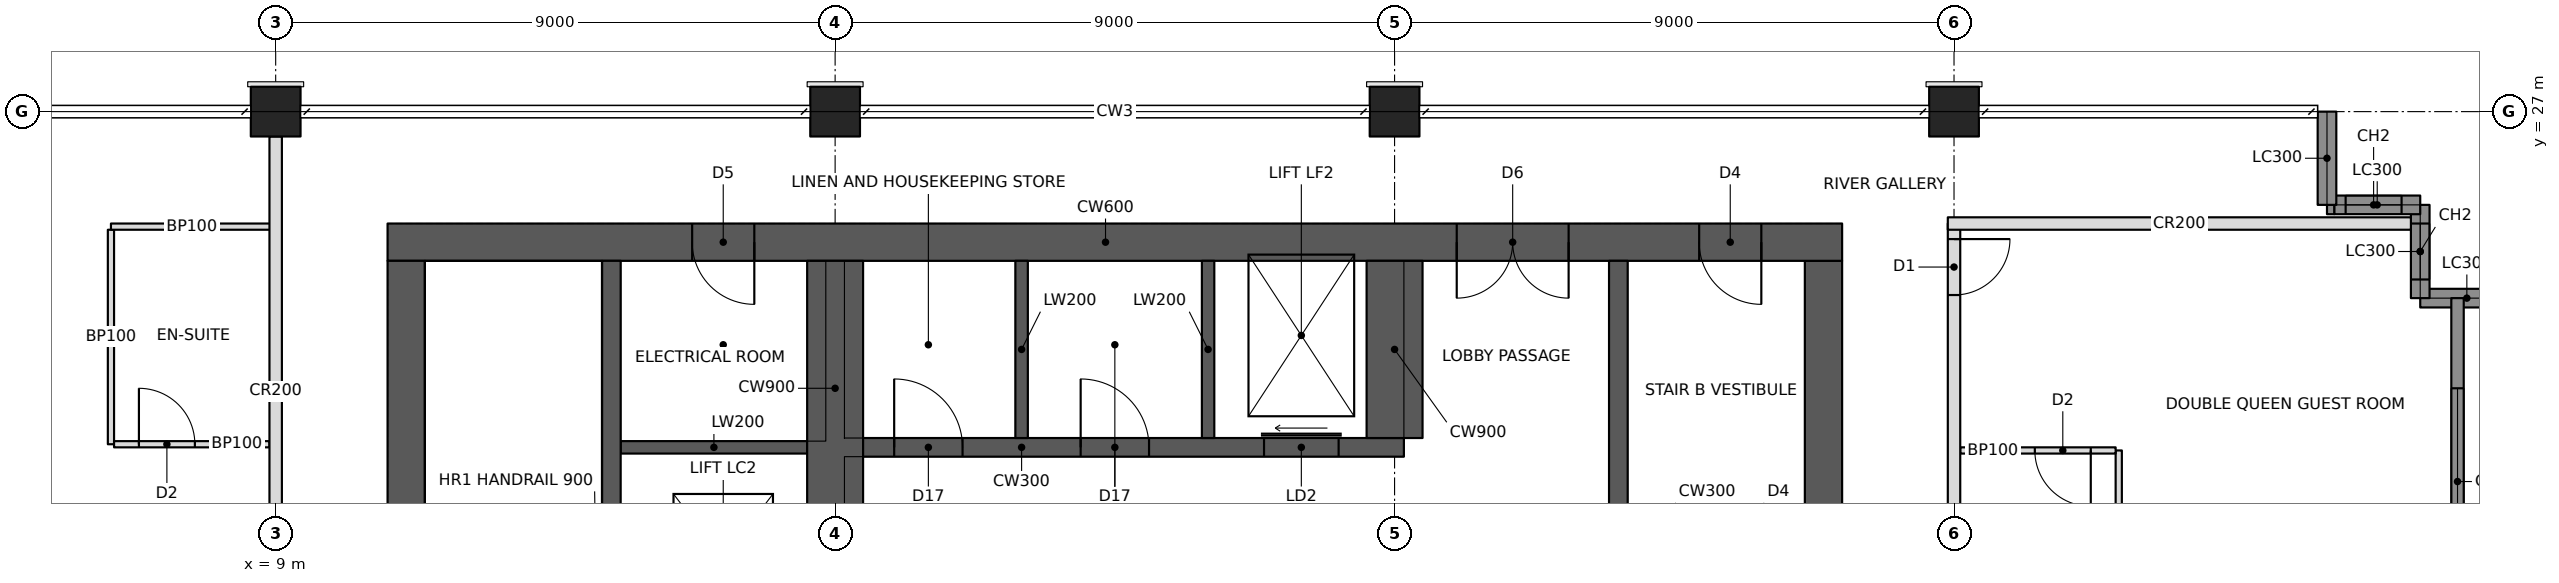
"""IFC4 building model, lengths in metres.
Left out: names, types, materials, properties, quantities, classifications, styles, units other than length and angle.
Written with IfcOpenShell. Run it as: python <this file> out.ifc"""

import sys

from ifc_helpers import new_model, si_unit, direction, frame, frame_2d, origin, origin_2d, place, context, subcontext, project, spatial, rectangle, hollow_rectangle, extrude, element, fill, save


model = new_model("IFC4")
c1 = context("Model", 3, precision=1e-05, world=origin(), true_north=direction((0.0, 1.0)))
c2 = subcontext(c1, "Body", "Model", "MODEL_VIEW")
j1 = project(units=[si_unit("LENGTHUNIT", "METRE"), si_unit("PLANEANGLEUNIT", "RADIAN")], contexts=[c1])
p1 = place(None, origin())
s1 = spatial("IfcSite", under=j1, at=p1, CompositionType="ELEMENT")
p2 = place(p1, origin())
s2 = spatial("IfcBuilding", under=s1, at=p2, CompositionType="ELEMENT")
p3 = place(p2, frame((0.0, 0.0, 218.2)))
s3 = spatial("IfcBuildingStorey", under=s2, at=p3, CompositionType="ELEMENT", Elevation=218.2)
for number, where, z_axis, x_axis in (
    (1, (9.0, 27.0, 0.0), (0.0, 0.0, 1.0), (1.0, 0.0, 0.0)),
    (2, (18.0, 27.0, 0.0), (0.0, 0.0, 1.0), (1.0, 0.0, 0.0)),
    (3, (27.0, 27.0, 0.0), (0.0, 0.0, 1.0), (1.0, 0.0, 0.0)),
    (4, (36.0, 27.0, 0.0), (0.0, 0.0, 1.0), (1.0, 0.0, 0.0)),
):
    element("IfcColumn", number, at=place(p3, frame(where, z_axis=z_axis, x_axis=x_axis)), inside=s3, PredefinedType="COLUMN", context=c2, shape_type="SweptSolid", body=[
        extrude(hollow_rectangle(XDim=0.8, YDim=0.8, WallThickness=0.06, at=origin_2d()), origin(), (0.0, 0.0, 1.0), 3.4),
    ])
p4 = place(p3, frame((10.8, 24.9, 0.0), z_axis=(0.0, 0.0, 1.0), x_axis=(1.0, 0.0, 0.0)))
e5 = element("IfcWall", 5, at=p4, inside=s3, PredefinedType="SHEAR", context=c2, shape_type="SweptSolid", body=[
    extrude(rectangle(XDim=23.4, YDim=0.6, at=frame_2d((11.7, 0.0))), origin(), (0.0, 0.0, 1.0), 3.4),
])
p5 = place(p4, frame((17.2, 0.0, 0.0)))
e6 = element("IfcOpeningElement", 6, at=p5, cuts=e5, PredefinedType="OPENING", context=c2, shape_type="SweptSolid", body=[
    extrude(rectangle(XDim=1.8, YDim=2.1, at=frame_2d((0.9, 1.05))), frame((0.0, 0.31, 0.0), z_axis=(0.0, -1.0, 0.0), x_axis=(1.0, 0.0, 0.0)), (0.0, 0.0, 1.0), 0.62),
])
p6 = place(p4, frame((21.1, 0.0, 0.0)))
e7 = element("IfcOpeningElement", 7, at=p6, cuts=e5, PredefinedType="OPENING", context=c2, shape_type="SweptSolid", body=[
    extrude(rectangle(XDim=1.0, YDim=2.1, at=frame_2d((0.5, 1.05))), frame((0.0, 0.31, 0.0), z_axis=(0.0, -1.0, 0.0), x_axis=(1.0, 0.0, 0.0)), (0.0, 0.0, 1.0), 0.62),
])
p7 = place(p4, frame((4.9, 0.0, 0.0)))
e8 = element("IfcOpeningElement", 8, at=p7, cuts=e5, PredefinedType="OPENING", context=c2, shape_type="SweptSolid", body=[
    extrude(rectangle(XDim=1.0, YDim=2.1, at=frame_2d((0.5, 1.05))), frame((0.0, 0.31, 0.0), z_axis=(0.0, -1.0, 0.0), x_axis=(1.0, 0.0, 0.0)), (0.0, 0.0, 1.0), 0.62),
])
for number, where, z_axis, x_axis in (
    (9, (11.1, 11.4, 0.0), (0.0, 0.0, 1.0), (0.0, 1.0, 0.0)),
    (10, (33.9, 11.4, 0.0), (0.0, 0.0, 1.0), (0.0, 1.0, 0.0)),
):
    element("IfcWall", number, at=place(p3, frame(where, z_axis=z_axis, x_axis=x_axis)), inside=s3, PredefinedType="SHEAR", context=c2, shape_type="SweptSolid", body=[
        extrude(rectangle(XDim=13.2, YDim=0.6, at=frame_2d((6.6, 0.0))), origin(), (0.0, 0.0, 1.0), 3.4),
    ])
p8 = place(p3, frame((14.4, 11.4, 0.0), z_axis=(0.0, 0.0, 1.0), x_axis=(0.0, 1.0, 0.0)))
e11 = element("IfcWall", 11, at=p8, inside=s3, PredefinedType="SHEAR", context=c2, shape_type="SweptSolid", body=[
    extrude(rectangle(XDim=13.2, YDim=0.3, at=frame_2d((6.6, 0.0))), origin(), (0.0, 0.0, 1.0), 3.4),
])
p9 = place(p3, frame((18.0, 11.4, 0.0), z_axis=(0.0, 0.0, 1.0), x_axis=(0.0, 1.0, 0.0)))
e12 = element("IfcWall", 12, at=p9, inside=s3, PredefinedType="SHEAR", context=c2, shape_type="SweptSolid", body=[
    extrude(rectangle(XDim=13.2, YDim=0.9, at=frame_2d((6.6, 0.0))), origin(), (0.0, 0.0, 1.0), 3.4),
])
p10 = place(p9, frame((3.6, 0.0, 0.0)))
e13 = element("IfcOpeningElement", 13, at=p10, cuts=e12, PredefinedType="OPENING", context=c2, shape_type="SweptSolid", body=[
    extrude(rectangle(XDim=1.0, YDim=2.1, at=frame_2d((0.5, 1.05))), frame((0.0, 0.46, 0.0), z_axis=(0.0, -1.0, 0.0), x_axis=(1.0, 0.0, 0.0)), (0.0, 0.0, 1.0), 0.92),
])
p11 = place(p9, frame((7.85, 0.0, 0.0)))
e14 = element("IfcOpeningElement", 14, at=p11, cuts=e12, PredefinedType="OPENING", context=c2, shape_type="SweptSolid", body=[
    extrude(rectangle(XDim=1.1, YDim=2.1, at=frame_2d((0.55, 1.05))), frame((0.0, 0.46, 0.0), z_axis=(0.0, -1.0, 0.0), x_axis=(1.0, 0.0, 0.0)), (0.0, 0.0, 1.0), 0.92),
])
p12 = place(p3, frame((18.15, 21.6, 0.0), z_axis=(0.0, 0.0, 1.0), x_axis=(1.0, 0.0, 0.0)))
e15 = element("IfcWall", 15, at=p12, inside=s3, PredefinedType="SHEAR", context=c2, shape_type="SweptSolid", body=[
    extrude(rectangle(XDim=9.0, YDim=0.3, at=frame_2d((4.5, 0.0))), origin(), (0.0, 0.0, 1.0), 3.4),
])
p13 = place(p12, frame((6.75, 0.0, 0.0)))
e16 = element("IfcOpeningElement", 16, at=p13, cuts=e15, PredefinedType="OPENING", context=c2, shape_type="SweptSolid", body=[
    extrude(rectangle(XDim=1.2, YDim=2.1, at=frame_2d((0.6, 1.05))), frame((0.0, 0.16, 0.0), z_axis=(0.0, -1.0, 0.0), x_axis=(1.0, 0.0, 0.0)), (0.0, 0.0, 1.0), 0.32),
])
p14 = place(p12, frame((0.8, 0.0, 0.0)))
e17 = element("IfcOpeningElement", 17, at=p14, cuts=e15, PredefinedType="OPENING", context=c2, shape_type="SweptSolid", body=[
    extrude(rectangle(XDim=1.1, YDim=2.1, at=frame_2d((0.55, 1.05))), frame((0.0, 0.16, 0.0), z_axis=(0.0, -1.0, 0.0), x_axis=(1.0, 0.0, 0.0)), (0.0, 0.0, 1.0), 0.32),
])
p15 = place(p12, frame((3.8, 0.0, 0.0)))
e18 = element("IfcOpeningElement", 18, at=p15, cuts=e15, PredefinedType="OPENING", context=c2, shape_type="SweptSolid", body=[
    extrude(rectangle(XDim=1.1, YDim=2.1, at=frame_2d((0.55, 1.05))), frame((0.0, 0.16, 0.0), z_axis=(0.0, -1.0, 0.0), x_axis=(1.0, 0.0, 0.0)), (0.0, 0.0, 1.0), 0.32),
])
p16 = place(p3, frame((27.0, 21.75, 0.0), z_axis=(0.0, 0.0, 1.0), x_axis=(0.0, 1.0, 0.0)))
e19 = element("IfcWall", 19, at=p16, inside=s3, PredefinedType="SHEAR", context=c2, shape_type="SweptSolid", body=[
    extrude(rectangle(XDim=2.85, YDim=0.9, at=frame_2d((1.425, 0.0))), origin(), (0.0, 0.0, 1.0), 3.4),
])
for number, where, z_axis, x_axis in (
    (20, (21.0, 21.75, 0.0), (0.0, 0.0, 1.0), (0.0, 1.0, 0.0)),
    (21, (24.0, 21.75, 0.0), (0.0, 0.0, 1.0), (0.0, 1.0, 0.0)),
):
    element("IfcWall", number, at=place(p3, frame(where, z_axis=z_axis, x_axis=x_axis)), inside=s3, PredefinedType="SHEAR", context=c2, shape_type="SweptSolid", body=[
        extrude(rectangle(XDim=2.85, YDim=0.2, at=frame_2d((1.425, 0.0))), origin(), (0.0, 0.0, 1.0), 3.4),
    ])
p17 = place(p3, frame((30.6, 11.4, 0.0), z_axis=(0.0, 0.0, 1.0), x_axis=(0.0, 1.0, 0.0)))
e22 = element("IfcWall", 22, at=p17, inside=s3, PredefinedType="SHEAR", context=c2, shape_type="SweptSolid", body=[
    extrude(rectangle(XDim=13.2, YDim=0.3, at=frame_2d((6.6, 0.0))), origin(), (0.0, 0.0, 1.0), 3.4),
])
p18 = place(p3, frame((14.55, 21.6, 0.0), z_axis=(0.0, 0.0, 1.0), x_axis=(1.0, 0.0, 0.0)))
e23 = element("IfcWall", 23, at=p18, inside=s3, PredefinedType="SHEAR", context=c2, shape_type="SweptSolid", body=[
    extrude(rectangle(XDim=3.0, YDim=0.2, at=frame_2d((1.5, 0.0))), origin(), (0.0, 0.0, 1.0), 3.4),
])
p19 = place(p3, frame((45.0, 24.0, 0.0), z_axis=(0.0, 0.0, 1.0), x_axis=(-1.0, 0.0, 0.0)))
e24 = element("IfcWall", 24, at=p19, inside=s3, PredefinedType="SOLIDWALL", context=c2, shape_type="SweptSolid", body=[
    extrude(rectangle(XDim=1.5, YDim=0.3, at=frame_2d((0.75, 0.0))), origin(), (0.0, 0.0, 1.0), 2.202),
])
p20 = place(p3, frame((43.5, 24.0, 0.0), z_axis=(0.0, 0.0, 1.0), x_axis=(0.0, 1.0, 0.0)))
e25 = element("IfcWall", 25, at=p20, inside=s3, PredefinedType="SOLIDWALL", context=c2, shape_type="SweptSolid", body=[
    extrude(rectangle(XDim=1.5, YDim=0.3, at=frame_2d((0.75, 0.0))), origin(), (0.0, 0.0, 1.0), 3.15),
])
p21 = place(p20, frame((0.3, 0.0, 0.6)))
e26 = element("IfcOpeningElement", 26, at=p21, cuts=e25, PredefinedType="OPENING", context=c2, shape_type="SweptSolid", body=[
    extrude(rectangle(XDim=0.9, YDim=2.2, at=frame_2d((0.45, 1.1))), frame((0.0, 0.16, 0.0), z_axis=(0.0, -1.0, 0.0), x_axis=(1.0, 0.0, 0.0)), (0.0, 0.0, 1.0), 0.32),
])
p22 = place(p3, frame((43.5, 25.5, 0.0), z_axis=(0.0, 0.0, 1.0), x_axis=(-1.0, 0.0, 0.0)))
e27 = element("IfcWall", 27, at=p22, inside=s3, PredefinedType="SOLIDWALL", context=c2, shape_type="SweptSolid", body=[
    extrude(rectangle(XDim=1.384, YDim=0.3, at=frame_2d((0.692, 0.0))), origin(), (0.0, 0.0, 1.0), 3.15),
])
p23 = place(p22, frame((0.3, 0.0, 0.6)))
e28 = element("IfcOpeningElement", 28, at=p23, cuts=e27, PredefinedType="OPENING", context=c2, shape_type="SweptSolid", body=[
    extrude(rectangle(XDim=0.9, YDim=2.2, at=frame_2d((0.45, 1.1))), frame((0.0, 0.16, 0.0), z_axis=(0.0, -1.0, 0.0), x_axis=(1.0, 0.0, 0.0)), (0.0, 0.0, 1.0), 0.32),
])
p24 = place(p3, frame((42.0, 25.5, 0.0), z_axis=(0.0, 0.0, 1.0), x_axis=(0.0, 1.0, 0.0)))
e29 = element("IfcWall", 29, at=p24, inside=s3, PredefinedType="SOLIDWALL", context=c2, shape_type="SweptSolid", body=[
    extrude(rectangle(XDim=1.5, YDim=0.3, at=frame_2d((0.75, 0.0))), origin(), (0.0, 0.0, 1.0), 2.202),
])
p25 = place(p3, frame((9.0, 18.4, 0.0), z_axis=(0.0, 0.0, 1.0), x_axis=(0.0, 1.0, 0.0)))
e30 = element("IfcWall", 30, at=p25, inside=s3, PredefinedType="PARTITIONING", context=c2, shape_type="SweptSolid", body=[
    extrude(rectangle(XDim=8.2, YDim=0.2, at=frame_2d((4.1, 0.0))), origin(), (0.0, 0.0, 1.0), 2.21),
])
p26 = place(p3, frame((36.0, 18.4, 0.0), z_axis=(0.0, 0.0, 1.0), x_axis=(0.0, 1.0, 0.0)))
e31 = element("IfcWall", 31, at=p26, inside=s3, PredefinedType="PARTITIONING", context=c2, shape_type="SweptSolid", body=[
    extrude(rectangle(XDim=6.8, YDim=0.2, at=frame_2d((3.4, 0.0))), origin(), (0.0, 0.0, 1.0), 2.21),
])
p27 = place(p26, frame((5.65, 0.0, 0.0)))
e32 = element("IfcOpeningElement", 32, at=p27, cuts=e31, PredefinedType="OPENING", context=c2, shape_type="SweptSolid", body=[
    extrude(rectangle(XDim=0.9, YDim=2.1, at=frame_2d((0.45, 1.05))), frame((0.0, 0.11, 0.0), z_axis=(0.0, -1.0, 0.0), x_axis=(1.0, 0.0, 0.0)), (0.0, 0.0, 1.0), 0.22),
])
p28 = place(p3, frame((35.9, 25.2, 0.0), z_axis=(0.0, 0.0, 1.0), x_axis=(1.0, 0.0, 0.0)))
e33 = element("IfcWall", 33, at=p28, inside=s3, PredefinedType="PARTITIONING", context=c2, shape_type="SweptSolid", body=[
    extrude(rectangle(XDim=7.45, YDim=0.2, at=frame_2d((3.725, 0.0))), origin(), (0.0, 0.0, 1.0), 2.21),
])
p29 = place(p3, frame((6.35, 21.65, 0.0), z_axis=(0.0, 0.0, 1.0), x_axis=(0.0, 1.0, 0.0)))
e34 = element("IfcWall", 34, at=p29, inside=s3, PredefinedType="PARTITIONING", context=c2, shape_type="SweptSolid", body=[
    extrude(rectangle(XDim=3.45, YDim=0.1, at=frame_2d((1.725, 0.0))), origin(), (0.0, 0.0, 1.0), 3.15),
])
p30 = place(p3, frame((8.9, 21.65, 0.0), z_axis=(0.0, 0.0, 1.0), x_axis=(-1.0, 0.0, 0.0)))
e35 = element("IfcWall", 35, at=p30, inside=s3, PredefinedType="PARTITIONING", context=c2, shape_type="SweptSolid", body=[
    extrude(rectangle(XDim=2.5, YDim=0.1, at=frame_2d((1.25, 0.0))), origin(), (0.0, 0.0, 1.0), 2.21),
])
p31 = place(p30, frame((1.2, 0.0, 0.0)))
e36 = element("IfcOpeningElement", 36, at=p31, cuts=e35, PredefinedType="OPENING", context=c2, shape_type="SweptSolid", body=[
    extrude(rectangle(XDim=0.9, YDim=2.1, at=frame_2d((0.45, 1.05))), frame((0.0, 0.06, 0.0), z_axis=(0.0, -1.0, 0.0), x_axis=(1.0, 0.0, 0.0)), (0.0, 0.0, 1.0), 0.12),
])
p32 = place(p3, frame((38.65, 18.1, 0.0), z_axis=(0.0, 0.0, 1.0), x_axis=(0.0, 1.0, 0.0)))
e37 = element("IfcWall", 37, at=p32, inside=s3, PredefinedType="PARTITIONING", context=c2, shape_type="SweptSolid", body=[
    extrude(rectangle(XDim=3.45, YDim=0.1, at=frame_2d((1.725, 0.0))), origin(), (0.0, 0.0, 1.0), 2.202),
])
p33 = place(p3, frame((36.1, 21.55, 0.0), z_axis=(0.0, 0.0, 1.0), x_axis=(1.0, 0.0, 0.0)))
e38 = element("IfcWall", 38, at=p33, inside=s3, PredefinedType="PARTITIONING", context=c2, shape_type="SweptSolid", body=[
    extrude(rectangle(XDim=2.5, YDim=0.1, at=frame_2d((1.25, 0.0))), origin(), (0.0, 0.0, 1.0), 2.21),
])
p34 = place(p33, frame((1.2, 0.0, 0.0)))
e39 = element("IfcOpeningElement", 39, at=p34, cuts=e38, PredefinedType="OPENING", context=c2, shape_type="SweptSolid", body=[
    extrude(rectangle(XDim=0.9, YDim=2.1, at=frame_2d((0.45, 1.05))), frame((0.0, 0.06, 0.0), z_axis=(0.0, -1.0, 0.0), x_axis=(1.0, 0.0, 0.0)), (0.0, 0.0, 1.0), 0.12),
])
p35 = place(p3, frame((6.35, 25.15, 0.0), z_axis=(0.0, 0.0, 1.0), x_axis=(1.0, 0.0, 0.0)))
e40 = element("IfcWall", 40, at=p35, inside=s3, PredefinedType="PARTITIONING", context=c2, shape_type="SweptSolid", body=[
    extrude(rectangle(XDim=2.6, YDim=0.1, at=frame_2d((1.3, 0.0))), origin(), (0.0, 0.0, 1.0), 2.21),
])
p36 = place(p3, frame((42.116, 25.5, 0.0), z_axis=(0.0, 0.0, 1.0), x_axis=(-1.0, 0.0, 0.0)))
e41 = element("IfcWall", 41, at=p36, inside=s3, PredefinedType="SOLIDWALL", context=c2, shape_type="SweptSolid", body=[
    extrude(rectangle(XDim=0.116, YDim=0.3, at=frame_2d((0.058, 0.0))), origin(), (0.0, 0.0, 1.0), 2.542),
])
p37 = place(p3, frame((44.1, 18.214, 0.0), z_axis=(0.0, 0.0, 1.0), x_axis=(0.0, 1.0, 0.0)))
e42 = element("IfcWall", 42, at=p37, inside=s3, PredefinedType="SOLIDWALL", context=c2, shape_type="SweptSolid", body=[
    extrude(rectangle(XDim=5.786, YDim=0.2, at=frame_2d((2.893, 0.0))), origin(), (0.0, 0.0, 1.0), 3.15),
])
p38 = place(p37, frame((1.336, 0.0, 0.6)))
e43 = element("IfcOpeningElement", 43, at=p38, cuts=e42, PredefinedType="OPENING", context=c2, shape_type="SweptSolid", body=[
    extrude(rectangle(XDim=3.0, YDim=2.2, at=frame_2d((1.5, 1.1))), frame((0.0, 0.11, 0.0), z_axis=(0.0, -1.0, 0.0), x_axis=(1.0, 0.0, 0.0)), (0.0, 0.0, 1.0), 0.22),
])
p39 = place(p21, origin())
e44 = element("IfcWindow", 44, at=p39, inside=s3, PartitioningType="SINGLE_PANEL", PredefinedType="WINDOW", context=c2, shape_type="SweptSolid", body=[
    extrude(rectangle(XDim=0.9, YDim=2.2, at=frame_2d((0.45, 1.1))), frame((0.0, 0.03, 0.0), z_axis=(0.0, -1.0, 0.0), x_axis=(1.0, 0.0, 0.0)), (0.0, 0.0, 1.0), 0.06),
])
fill(e26, e44)
p40 = place(p23, origin())
e45 = element("IfcWindow", 45, at=p40, inside=s3, PartitioningType="SINGLE_PANEL", PredefinedType="WINDOW", context=c2, shape_type="SweptSolid", body=[
    extrude(rectangle(XDim=0.9, YDim=2.2, at=frame_2d((0.45, 1.1))), frame((0.0, 0.03, 0.0), z_axis=(0.0, -1.0, 0.0), x_axis=(1.0, 0.0, 0.0)), (0.0, 0.0, 1.0), 0.06),
])
fill(e28, e45)
p41 = place(p38, origin())
e46 = element("IfcWindow", 46, at=p41, inside=s3, PartitioningType="TRIPLE_PANEL_VERTICAL", PredefinedType="WINDOW", context=c2, shape_type="SweptSolid", body=[
    extrude(rectangle(XDim=3.0, YDim=2.2, at=frame_2d((1.5, 1.1))), frame((0.0, 0.03, 0.0), z_axis=(0.0, -1.0, 0.0), x_axis=(1.0, 0.0, 0.0)), (0.0, 0.0, 1.0), 0.06),
])
fill(e43, e46)
p42 = place(p31, frame((0.9, 0.0, 0.0), z_axis=(0.0, 0.0, 1.0), x_axis=(-1.0, 0.0, 0.0)))
e47 = element("IfcDoor", 47, at=p42, inside=s3, OperationType="SINGLE_SWING_LEFT", PredefinedType="DOOR", context=c2, shape_type="SweptSolid", body=[
    extrude(rectangle(XDim=0.9, YDim=2.1, at=frame_2d((0.45, 1.05))), frame((0.0, 0.025, 0.0), z_axis=(0.0, -1.0, 0.0), x_axis=(1.0, 0.0, 0.0)), (0.0, 0.0, 1.0), 0.05),
])
fill(e36, e47)
p43 = place(p34, frame((0.9, 0.0, 0.0), z_axis=(0.0, 0.0, 1.0), x_axis=(-1.0, 0.0, 0.0)))
e48 = element("IfcDoor", 48, at=p43, inside=s3, OperationType="SINGLE_SWING_LEFT", PredefinedType="DOOR", context=c2, shape_type="SweptSolid", body=[
    extrude(rectangle(XDim=0.9, YDim=2.1, at=frame_2d((0.45, 1.05))), frame((0.0, 0.025, 0.0), z_axis=(0.0, -1.0, 0.0), x_axis=(1.0, 0.0, 0.0)), (0.0, 0.0, 1.0), 0.05),
])
fill(e39, e48)
p44 = place(p27, frame((0.9, 0.0, 0.0), z_axis=(0.0, 0.0, 1.0), x_axis=(-1.0, 0.0, 0.0)))
e49 = element("IfcDoor", 49, at=p44, inside=s3, OperationType="SINGLE_SWING_LEFT", PredefinedType="DOOR", context=c2, shape_type="SweptSolid", body=[
    extrude(rectangle(XDim=0.9, YDim=2.1, at=frame_2d((0.45, 1.05))), frame((0.0, 0.025, 0.0), z_axis=(0.0, -1.0, 0.0), x_axis=(1.0, 0.0, 0.0)), (0.0, 0.0, 1.0), 0.05),
])
fill(e32, e49)
p45 = place(p5, frame((1.8, 0.0, 0.0), z_axis=(0.0, 0.0, 1.0), x_axis=(-1.0, 0.0, 0.0)))
e50 = element("IfcDoor", 50, at=p45, inside=s3, OperationType="DOUBLE_DOOR_SINGLE_SWING", PredefinedType="DOOR", context=c2, shape_type="SweptSolid", body=[
    extrude(rectangle(XDim=1.8, YDim=2.1, at=frame_2d((0.9, 1.05))), frame((0.0, 0.025, 0.0), z_axis=(0.0, -1.0, 0.0), x_axis=(1.0, 0.0, 0.0)), (0.0, 0.0, 1.0), 0.05),
])
fill(e6, e50)
p46 = place(p6, frame((1.0, 0.0, 0.0), z_axis=(0.0, 0.0, 1.0), x_axis=(-1.0, 0.0, 0.0)))
e51 = element("IfcDoor", 51, at=p46, inside=s3, OperationType="SINGLE_SWING_LEFT", PredefinedType="DOOR", context=c2, shape_type="SweptSolid", body=[
    extrude(rectangle(XDim=1.0, YDim=2.1, at=frame_2d((0.5, 1.05))), frame((0.0, 0.025, 0.0), z_axis=(0.0, -1.0, 0.0), x_axis=(1.0, 0.0, 0.0)), (0.0, 0.0, 1.0), 0.05),
])
fill(e7, e51)
p47 = place(p7, frame((1.0, 0.0, 0.0), z_axis=(0.0, 0.0, 1.0), x_axis=(-1.0, 0.0, 0.0)))
e52 = element("IfcDoor", 52, at=p47, inside=s3, OperationType="SINGLE_SWING_LEFT", PredefinedType="DOOR", context=c2, shape_type="SweptSolid", body=[
    extrude(rectangle(XDim=1.0, YDim=2.1, at=frame_2d((0.5, 1.05))), frame((0.0, 0.025, 0.0), z_axis=(0.0, -1.0, 0.0), x_axis=(1.0, 0.0, 0.0)), (0.0, 0.0, 1.0), 0.05),
])
fill(e8, e52)
p48 = place(p13, origin())
e53 = element("IfcDoor", 53, at=p48, inside=s3, OperationType="SLIDING_TO_LEFT", PredefinedType="DOOR", context=c2, shape_type="SweptSolid", body=[
    extrude(rectangle(XDim=1.2, YDim=2.1, at=frame_2d((0.6, 1.05))), frame((0.0, 0.025, 0.0), z_axis=(0.0, -1.0, 0.0), x_axis=(1.0, 0.0, 0.0)), (0.0, 0.0, 1.0), 0.05),
])
fill(e16, e53)
p49 = place(p14, origin())
e54 = element("IfcDoor", 54, at=p49, inside=s3, OperationType="SINGLE_SWING_LEFT", PredefinedType="DOOR", context=c2, shape_type="SweptSolid", body=[
    extrude(rectangle(XDim=1.1, YDim=2.1, at=frame_2d((0.55, 1.05))), frame((0.0, 0.025, 0.0), z_axis=(0.0, -1.0, 0.0), x_axis=(1.0, 0.0, 0.0)), (0.0, 0.0, 1.0), 0.05),
])
fill(e17, e54)
p50 = place(p15, origin())
e55 = element("IfcDoor", 55, at=p50, inside=s3, OperationType="SINGLE_SWING_LEFT", PredefinedType="DOOR", context=c2, shape_type="SweptSolid", body=[
    extrude(rectangle(XDim=1.1, YDim=2.1, at=frame_2d((0.55, 1.05))), frame((0.0, 0.025, 0.0), z_axis=(0.0, -1.0, 0.0), x_axis=(1.0, 0.0, 0.0)), (0.0, 0.0, 1.0), 0.05),
])
fill(e18, e55)
save(model, sys.argv[1])
